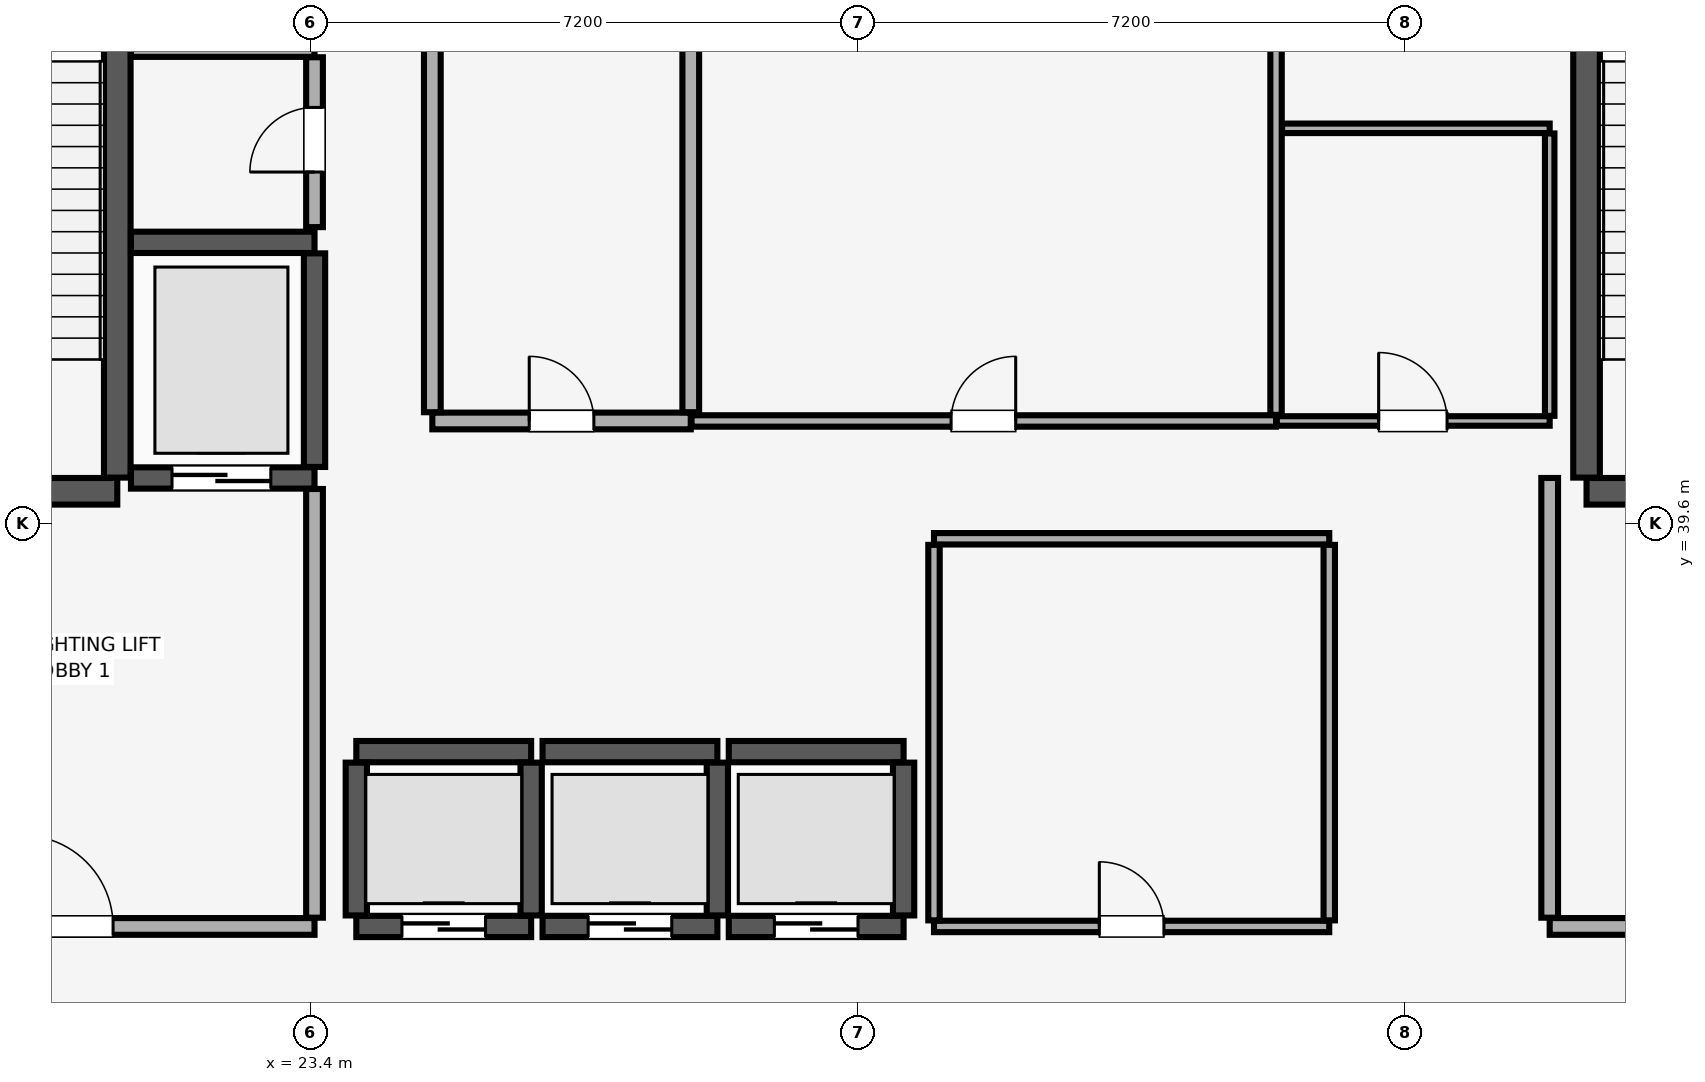
"""IFC4 building model, lengths in metres.
Left out: names, types, materials, properties, quantities, classifications, styles, units other than length and angle.
Written with IfcOpenShell. Run it as: python <this file> out.ifc"""

import sys

from ifc_helpers import new_model, si_unit, direction, frame, frame_2d, origin, place, context, subcontext, project, spatial, rectangle, extrude, element, fill, save


model = new_model("IFC4")
c1 = context("Model", 3, precision=1e-05, world=origin(), true_north=direction((0.0, 1.0)))
c2 = subcontext(c1, "Body", "Model", "MODEL_VIEW")
j1 = project(units=[si_unit("LENGTHUNIT", "METRE"), si_unit("PLANEANGLEUNIT", "RADIAN")], contexts=[c1])
p1 = place(None, origin())
s1 = spatial("IfcSite", under=j1, at=p1, CompositionType="ELEMENT")
p2 = place(p1, origin())
s2 = spatial("IfcBuilding", under=s1, at=p2, CompositionType="ELEMENT")
p3 = place(p2, frame((0.0, 0.0, 280.5)))
s3 = spatial("IfcBuildingStorey", under=s2, at=p3, CompositionType="ELEMENT", Elevation=280.5)
p4 = place(p3, frame((16.555, 40.025, 0.0), z_axis=(0.0, 0.0, 1.0), x_axis=(1.0, 0.0, 0.0)))
e1 = element("IfcWall", 1, at=p4, inside=s3, PredefinedType="SHEAR", context=c2, shape_type="SweptSolid", body=[
    extrude(rectangle(XDim=4.3, YDim=0.35, at=frame_2d((2.15, 0.0))), origin(), (0.0, 0.0, 1.0), 5.1),
])
p5 = place(p4, frame((1.91, 0.0, 0.0)))
e2 = element("IfcOpeningElement", 2, at=p5, cuts=e1, PredefinedType="OPENING", context=c2, shape_type="SweptSolid", body=[
    extrude(rectangle(XDim=1.15, YDim=2.15, at=frame_2d((0.575, 1.075))), frame((0.0, 0.185, 0.0), z_axis=(0.0, -1.0, 0.0), x_axis=(1.0, 0.0, 0.0)), (0.0, 0.0, 1.0), 0.37),
])
p6 = place(p3, frame((20.855, 40.205, 0.0), z_axis=(0.0, 0.0, 1.0), x_axis=(0.0, 1.0, 0.0)))
e3 = element("IfcWall", 3, at=p6, inside=s3, PredefinedType="SHEAR", context=c2, shape_type="SweptSolid", body=[
    extrude(rectangle(XDim=8.09, YDim=0.35, at=frame_2d((4.045, 0.0))), origin(), (0.0, 0.0, 1.0), 5.1),
])
p7 = place(p3, frame((40.185, 40.025, 0.0), z_axis=(0.0, 0.0, 1.0), x_axis=(1.0, 0.0, 0.0)))
e4 = element("IfcWall", 4, at=p7, inside=s3, PredefinedType="SHEAR", context=c2, shape_type="SweptSolid", body=[
    extrude(rectangle(XDim=3.63, YDim=0.35, at=frame_2d((1.815, 0.0))), origin(), (0.0, 0.0, 1.0), 5.1),
])
p8 = place(p7, frame((1.24, 0.0, 0.0)))
e5 = element("IfcOpeningElement", 5, at=p8, cuts=e4, PredefinedType="OPENING", context=c2, shape_type="SweptSolid", body=[
    extrude(rectangle(XDim=1.15, YDim=2.15, at=frame_2d((0.575, 1.075))), frame((0.0, 0.185, 0.0), z_axis=(0.0, -1.0, 0.0), x_axis=(1.0, 0.0, 0.0)), (0.0, 0.0, 1.0), 0.37),
])
p9 = place(p3, frame((40.185, 40.205, 0.0), z_axis=(0.0, 0.0, 1.0), x_axis=(0.0, 1.0, 0.0)))
e6 = element("IfcWall", 6, at=p9, inside=s3, PredefinedType="SHEAR", context=c2, shape_type="SweptSolid", body=[
    extrude(rectangle(XDim=8.09, YDim=0.35, at=frame_2d((4.045, 0.0))), origin(), (0.0, 0.0, 1.0), 5.1),
])
p10 = place(p3, frame((24.0, 34.3, 0.0), z_axis=(0.0, 0.0, 1.0), x_axis=(1.0, 0.0, 0.0)))
e7 = element("IfcWall", 7, at=p10, inside=s3, PredefinedType="SHEAR", context=c2, shape_type="SweptSolid", body=[
    extrude(rectangle(XDim=2.3, YDim=0.28, at=frame_2d((1.15, 0.0))), origin(), (0.0, 0.0, 1.0), 5.1),
])
p11 = place(p10, frame((0.6, 0.0, 0.0)))
e8 = element("IfcOpeningElement", 8, at=p11, cuts=e7, PredefinedType="OPENING", context=c2, shape_type="SweptSolid", body=[
    extrude(rectangle(XDim=1.1, YDim=2.2, at=frame_2d((0.55, 1.1))), frame((0.0, 0.15, 0.0), z_axis=(0.0, -1.0, 0.0), x_axis=(1.0, 0.0, 0.0)), (0.0, 0.0, 1.0), 0.3),
])
p12 = place(p3, frame((24.0, 36.6, 0.0), z_axis=(0.0, 0.0, 1.0), x_axis=(1.0, 0.0, 0.0)))
e9 = element("IfcWall", 9, at=p12, inside=s3, PredefinedType="SHEAR", context=c2, shape_type="SweptSolid", body=[
    extrude(rectangle(XDim=2.3, YDim=0.28, at=frame_2d((1.15, 0.0))), origin(), (0.0, 0.0, 1.0), 5.1),
])
for number, where, z_axis, x_axis in (
    (10, (24.0, 34.445, 0.0), (0.0, 0.0, 1.0), (0.0, 1.0, 0.0)),
    (11, (26.3, 34.445, 0.0), (0.0, 0.0, 1.0), (0.0, 1.0, 0.0)),
):
    element("IfcWall", number, at=place(p3, frame(where, z_axis=z_axis, x_axis=x_axis)), inside=s3, PredefinedType="SHEAR", context=c2, shape_type="SweptSolid", body=[
        extrude(rectangle(XDim=2.01, YDim=0.28, at=frame_2d((1.005, 0.0))), origin(), (0.0, 0.0, 1.0), 5.1),
    ])
p13 = place(p3, frame((26.45, 34.3, 0.0), z_axis=(0.0, 0.0, 1.0), x_axis=(1.0, 0.0, 0.0)))
e12 = element("IfcWall", 12, at=p13, inside=s3, PredefinedType="SHEAR", context=c2, shape_type="SweptSolid", body=[
    extrude(rectangle(XDim=2.3, YDim=0.28, at=frame_2d((1.15, 0.0))), origin(), (0.0, 0.0, 1.0), 5.1),
])
p14 = place(p13, frame((0.6, 0.0, 0.0)))
e13 = element("IfcOpeningElement", 13, at=p14, cuts=e12, PredefinedType="OPENING", context=c2, shape_type="SweptSolid", body=[
    extrude(rectangle(XDim=1.1, YDim=2.2, at=frame_2d((0.55, 1.1))), frame((0.0, 0.15, 0.0), z_axis=(0.0, -1.0, 0.0), x_axis=(1.0, 0.0, 0.0)), (0.0, 0.0, 1.0), 0.3),
])
p15 = place(p3, frame((26.45, 36.6, 0.0), z_axis=(0.0, 0.0, 1.0), x_axis=(1.0, 0.0, 0.0)))
e14 = element("IfcWall", 14, at=p15, inside=s3, PredefinedType="SHEAR", context=c2, shape_type="SweptSolid", body=[
    extrude(rectangle(XDim=2.3, YDim=0.28, at=frame_2d((1.15, 0.0))), origin(), (0.0, 0.0, 1.0), 5.1),
])
p16 = place(p3, frame((28.75, 34.445, 0.0), z_axis=(0.0, 0.0, 1.0), x_axis=(0.0, 1.0, 0.0)))
e15 = element("IfcWall", 15, at=p16, inside=s3, PredefinedType="SHEAR", context=c2, shape_type="SweptSolid", body=[
    extrude(rectangle(XDim=2.01, YDim=0.28, at=frame_2d((1.005, 0.0))), origin(), (0.0, 0.0, 1.0), 5.1),
])
p17 = place(p3, frame((28.9, 34.3, 0.0), z_axis=(0.0, 0.0, 1.0), x_axis=(1.0, 0.0, 0.0)))
e16 = element("IfcWall", 16, at=p17, inside=s3, PredefinedType="SHEAR", context=c2, shape_type="SweptSolid", body=[
    extrude(rectangle(XDim=2.3, YDim=0.28, at=frame_2d((1.15, 0.0))), origin(), (0.0, 0.0, 1.0), 5.1),
])
p18 = place(p17, frame((0.6, 0.0, 0.0)))
e17 = element("IfcOpeningElement", 17, at=p18, cuts=e16, PredefinedType="OPENING", context=c2, shape_type="SweptSolid", body=[
    extrude(rectangle(XDim=1.1, YDim=2.2, at=frame_2d((0.55, 1.1))), frame((0.0, 0.15, 0.0), z_axis=(0.0, -1.0, 0.0), x_axis=(1.0, 0.0, 0.0)), (0.0, 0.0, 1.0), 0.3),
])
p19 = place(p3, frame((28.9, 36.6, 0.0), z_axis=(0.0, 0.0, 1.0), x_axis=(1.0, 0.0, 0.0)))
e18 = element("IfcWall", 18, at=p19, inside=s3, PredefinedType="SHEAR", context=c2, shape_type="SweptSolid", body=[
    extrude(rectangle(XDim=2.3, YDim=0.28, at=frame_2d((1.15, 0.0))), origin(), (0.0, 0.0, 1.0), 5.1),
])
p20 = place(p3, frame((31.2, 34.445, 0.0), z_axis=(0.0, 0.0, 1.0), x_axis=(0.0, 1.0, 0.0)))
e19 = element("IfcWall", 19, at=p20, inside=s3, PredefinedType="SHEAR", context=c2, shape_type="SweptSolid", body=[
    extrude(rectangle(XDim=2.01, YDim=0.28, at=frame_2d((1.005, 0.0))), origin(), (0.0, 0.0, 1.0), 5.1),
])
p21 = place(p3, frame((21.035, 40.2, 0.0), z_axis=(0.0, 0.0, 1.0), x_axis=(1.0, 0.0, 0.0)))
e20 = element("IfcWall", 20, at=p21, inside=s3, PredefinedType="SHEAR", context=c2, shape_type="SweptSolid", body=[
    extrude(rectangle(XDim=2.415, YDim=0.28, at=frame_2d((1.208, 0.0))), origin(), (0.0, 0.0, 1.0), 5.1),
])
p22 = place(p21, frame((0.54, 0.0, 0.0)))
e21 = element("IfcOpeningElement", 21, at=p22, cuts=e20, PredefinedType="OPENING", context=c2, shape_type="SweptSolid", body=[
    extrude(rectangle(XDim=1.3, YDim=2.3, at=frame_2d((0.65, 1.15))), frame((0.0, 0.15, 0.0), z_axis=(0.0, -1.0, 0.0), x_axis=(1.0, 0.0, 0.0)), (0.0, 0.0, 1.0), 0.3),
])
p23 = place(p3, frame((21.035, 43.3, 0.0), z_axis=(0.0, 0.0, 1.0), x_axis=(1.0, 0.0, 0.0)))
e22 = element("IfcWall", 22, at=p23, inside=s3, PredefinedType="SHEAR", context=c2, shape_type="SweptSolid", body=[
    extrude(rectangle(XDim=2.415, YDim=0.28, at=frame_2d((1.208, 0.0))), origin(), (0.0, 0.0, 1.0), 5.1),
])
p24 = place(p3, frame((23.45, 40.345, 0.0), z_axis=(0.0, 0.0, 1.0), x_axis=(0.0, 1.0, 0.0)))
e23 = element("IfcWall", 23, at=p24, inside=s3, PredefinedType="SHEAR", context=c2, shape_type="SweptSolid", body=[
    extrude(rectangle(XDim=2.81, YDim=0.28, at=frame_2d((1.405, 0.0))), origin(), (0.0, 0.0, 1.0), 5.1),
])
p25 = place(p3, frame((17.4, 34.3, 0.0), z_axis=(0.0, 0.0, 1.0), x_axis=(1.0, 0.0, 0.0)))
e24 = element("IfcWall", 24, at=p25, inside=s3, PredefinedType="PARTITIONING", context=c2, shape_type="SweptSolid", body=[
    extrude(rectangle(XDim=6.05, YDim=0.22, at=frame_2d((3.025, 0.0))), origin(), (0.0, 0.0, 1.0), 5.1),
])
p26 = place(p25, frame((2.2, 0.0, 0.0)))
e25 = element("IfcOpeningElement", 25, at=p26, cuts=e24, PredefinedType="OPENING", context=c2, shape_type="SweptSolid", body=[
    extrude(rectangle(XDim=1.2, YDim=2.15, at=frame_2d((0.6, 1.075))), frame((0.0, 0.12, 0.0), z_axis=(0.0, -1.0, 0.0), x_axis=(1.0, 0.0, 0.0)), (0.0, 0.0, 1.0), 0.24),
])
p27 = place(p3, frame((23.45, 34.415, 0.0), z_axis=(0.0, 0.0, 1.0), x_axis=(0.0, 1.0, 0.0)))
e26 = element("IfcWall", 26, at=p27, inside=s3, PredefinedType="PARTITIONING", context=c2, shape_type="SweptSolid", body=[
    extrude(rectangle(XDim=5.64, YDim=0.22, at=frame_2d((2.82, 0.0))), origin(), (0.0, 0.0, 1.0), 5.1),
])
p28 = place(p3, frame((39.7, 34.3, 0.0), z_axis=(0.0, 0.0, 1.0), x_axis=(1.0, 0.0, 0.0)))
e27 = element("IfcWall", 27, at=p28, inside=s3, PredefinedType="PARTITIONING", context=c2, shape_type="SweptSolid", body=[
    extrude(rectangle(XDim=4.6, YDim=0.22, at=frame_2d((2.3, 0.0))), origin(), (0.0, 0.0, 1.0), 5.1),
])
p29 = place(p28, frame((1.7, 0.0, 0.0)))
e28 = element("IfcOpeningElement", 28, at=p29, cuts=e27, PredefinedType="OPENING", context=c2, shape_type="SweptSolid", body=[
    extrude(rectangle(XDim=1.2, YDim=2.15, at=frame_2d((0.6, 1.075))), frame((0.0, 0.12, 0.0), z_axis=(0.0, -1.0, 0.0), x_axis=(1.0, 0.0, 0.0)), (0.0, 0.0, 1.0), 0.24),
])
p30 = place(p3, frame((39.7, 34.415, 0.0), z_axis=(0.0, 0.0, 1.0), x_axis=(0.0, 1.0, 0.0)))
e29 = element("IfcWall", 29, at=p30, inside=s3, PredefinedType="PARTITIONING", context=c2, shape_type="SweptSolid", body=[
    extrude(rectangle(XDim=5.785, YDim=0.22, at=frame_2d((2.893, 0.0))), origin(), (0.0, 0.0, 1.0), 5.1),
])
p31 = place(p3, frame((21.035, 45.85, 0.0), z_axis=(0.0, 0.0, 1.0), x_axis=(1.0, 0.0, 0.0)))
e30 = element("IfcWall", 30, at=p31, inside=s3, PredefinedType="PARTITIONING", context=c2, shape_type="SweptSolid", body=[
    extrude(rectangle(XDim=2.415, YDim=0.22, at=frame_2d((1.208, 0.0))), origin(), (0.0, 0.0, 1.0), 5.1),
])
p32 = place(p3, frame((23.45, 43.5, 0.0), z_axis=(0.0, 0.0, 1.0), x_axis=(0.0, 1.0, 0.0)))
e31 = element("IfcWall", 31, at=p32, inside=s3, PredefinedType="PARTITIONING", context=c2, shape_type="SweptSolid", body=[
    extrude(rectangle(XDim=2.235, YDim=0.22, at=frame_2d((1.118, 0.0))), origin(), (0.0, 0.0, 1.0), 5.1),
])
p33 = place(p32, frame((0.725, 0.0, 0.0)))
e32 = element("IfcOpeningElement", 32, at=p33, cuts=e31, PredefinedType="OPENING", context=c2, shape_type="SweptSolid", body=[
    extrude(rectangle(XDim=0.85, YDim=2.1, at=frame_2d((0.425, 1.05))), frame((0.0, 0.12, 0.0), z_axis=(0.0, -1.0, 0.0), x_axis=(1.0, 0.0, 0.0)), (0.0, 0.0, 1.0), 0.24),
])
p34 = place(p3, frame((31.6, 34.3, 0.0), z_axis=(0.0, 0.0, 1.0), x_axis=(1.0, 0.0, 0.0)))
e33 = element("IfcWall", 33, at=p34, inside=s3, PredefinedType="PARTITIONING", context=c2, shape_type="SweptSolid", body=[
    extrude(rectangle(XDim=5.2, YDim=0.15, at=frame_2d((2.6, 0.0))), origin(), (0.0, 0.0, 1.0), 5.1),
])
p35 = place(p34, frame((2.175, 0.0, 0.0)))
e34 = element("IfcOpeningElement", 34, at=p35, cuts=e33, PredefinedType="OPENING", context=c2, shape_type="SweptSolid", body=[
    extrude(rectangle(XDim=0.85, YDim=2.1, at=frame_2d((0.425, 1.05))), frame((0.0, 0.085, 0.0), z_axis=(0.0, -1.0, 0.0), x_axis=(1.0, 0.0, 0.0)), (0.0, 0.0, 1.0), 0.17),
])
p36 = place(p3, frame((31.6, 39.4, 0.0), z_axis=(0.0, 0.0, 1.0), x_axis=(1.0, 0.0, 0.0)))
e35 = element("IfcWall", 35, at=p36, inside=s3, PredefinedType="PARTITIONING", context=c2, shape_type="SweptSolid", body=[
    extrude(rectangle(XDim=5.2, YDim=0.15, at=frame_2d((2.6, 0.0))), origin(), (0.0, 0.0, 1.0), 5.1),
])
for number, where, z_axis, x_axis in (
    (36, (31.6, 34.38, 0.0), (0.0, 0.0, 1.0), (0.0, 1.0, 0.0)),
    (37, (36.8, 34.38, 0.0), (0.0, 0.0, 1.0), (0.0, 1.0, 0.0)),
):
    element("IfcWall", number, at=place(p3, frame(where, z_axis=z_axis, x_axis=x_axis)), inside=s3, PredefinedType="PARTITIONING", context=c2, shape_type="SweptSolid", body=[
        extrude(rectangle(XDim=4.94, YDim=0.15, at=frame_2d((2.47, 0.0))), origin(), (0.0, 0.0, 1.0), 5.1),
    ])
p37 = place(p3, frame((25.0, 40.95, 0.0), z_axis=(0.0, 0.0, 1.0), x_axis=(1.0, 0.0, 0.0)))
e38 = element("IfcWall", 38, at=p37, inside=s3, PredefinedType="PARTITIONING", context=c2, shape_type="SweptSolid", body=[
    extrude(rectangle(XDim=3.4, YDim=0.22, at=frame_2d((1.7, 0.0))), origin(), (0.0, 0.0, 1.0), 5.1),
])
p38 = place(p37, frame((1.275, 0.0, 0.0)))
e39 = element("IfcOpeningElement", 39, at=p38, cuts=e38, PredefinedType="OPENING", context=c2, shape_type="SweptSolid", body=[
    extrude(rectangle(XDim=0.85, YDim=2.1, at=frame_2d((0.425, 1.05))), frame((0.0, 0.12, 0.0), z_axis=(0.0, -1.0, 0.0), x_axis=(1.0, 0.0, 0.0)), (0.0, 0.0, 1.0), 0.24),
])
for number, where, z_axis, x_axis in (
    (40, (25.0, 41.065, 0.0), (0.0, 0.0, 1.0), (0.0, 1.0, 0.0)),
    (41, (28.4, 41.065, 0.0), (0.0, 0.0, 1.0), (0.0, 1.0, 0.0)),
):
    element("IfcWall", number, at=place(p3, frame(where, z_axis=z_axis, x_axis=x_axis)), inside=s3, PredefinedType="PARTITIONING", context=c2, shape_type="SweptSolid", body=[
        extrude(rectangle(XDim=7.785, YDim=0.22, at=frame_2d((3.893, 0.0))), origin(), (0.0, 0.0, 1.0), 5.1),
    ])
p39 = place(p3, frame((28.41, 40.95, 0.0), z_axis=(0.0, 0.0, 1.0), x_axis=(1.0, 0.0, 0.0)))
e42 = element("IfcWall", 42, at=p39, inside=s3, PredefinedType="PARTITIONING", context=c2, shape_type="SweptSolid", body=[
    extrude(rectangle(XDim=7.69, YDim=0.15, at=frame_2d((3.845, 0.0))), origin(), (0.0, 0.0, 1.0), 5.1),
])
p40 = place(p39, frame((3.415, 0.0, 0.0)))
e43 = element("IfcOpeningElement", 43, at=p40, cuts=e42, PredefinedType="OPENING", context=c2, shape_type="SweptSolid", body=[
    extrude(rectangle(XDim=0.85, YDim=2.1, at=frame_2d((0.425, 1.05))), frame((0.0, 0.085, 0.0), z_axis=(0.0, -1.0, 0.0), x_axis=(1.0, 0.0, 0.0)), (0.0, 0.0, 1.0), 0.17),
])
p41 = place(p3, frame((36.1, 41.03, 0.0), z_axis=(0.0, 0.0, 1.0), x_axis=(0.0, 1.0, 0.0)))
e44 = element("IfcWall", 44, at=p41, inside=s3, PredefinedType="PARTITIONING", context=c2, shape_type="SweptSolid", body=[
    extrude(rectangle(XDim=7.82, YDim=0.15, at=frame_2d((3.91, 0.0))), origin(), (0.0, 0.0, 1.0), 5.1),
])
p42 = place(p3, frame((36.11, 40.95, 0.0), z_axis=(0.0, 0.0, 1.0), x_axis=(1.0, 0.0, 0.0)))
e45 = element("IfcWall", 45, at=p42, inside=s3, PredefinedType="PARTITIONING", context=c2, shape_type="SweptSolid", body=[
    extrude(rectangle(XDim=3.59, YDim=0.125, at=frame_2d((1.795, 0.0))), origin(), (0.0, 0.0, 1.0), 5.1),
])
p43 = place(p42, frame((1.34, 0.0, 0.0)))
e46 = element("IfcOpeningElement", 46, at=p43, cuts=e45, PredefinedType="OPENING", context=c2, shape_type="SweptSolid", body=[
    extrude(rectangle(XDim=0.9, YDim=2.1, at=frame_2d((0.45, 1.05))), frame((0.0, 0.073, 0.0), z_axis=(0.0, -1.0, 0.0), x_axis=(1.0, 0.0, 0.0)), (0.0, 0.0, 1.0), 0.145),
])
p44 = place(p3, frame((36.18, 44.8, 0.0), z_axis=(0.0, 0.0, 1.0), x_axis=(1.0, 0.0, 0.0)))
e47 = element("IfcWall", 47, at=p44, inside=s3, PredefinedType="PARTITIONING", context=c2, shape_type="SweptSolid", body=[
    extrude(rectangle(XDim=3.52, YDim=0.125, at=frame_2d((1.76, 0.0))), origin(), (0.0, 0.0, 1.0), 5.1),
])
p45 = place(p3, frame((39.7, 41.018, 0.0), z_axis=(0.0, 0.0, 1.0), x_axis=(0.0, 1.0, 0.0)))
e48 = element("IfcWall", 48, at=p45, inside=s3, PredefinedType="PARTITIONING", context=c2, shape_type="SweptSolid", body=[
    extrude(rectangle(XDim=3.715, YDim=0.125, at=frame_2d((1.857, 0.0))), origin(), (0.0, 0.0, 1.0), 5.1),
])
p46 = place(p11, origin())
e49 = element("IfcDoor", 49, at=p46, inside=s3, OperationType="DOUBLE_DOOR_SLIDING", PredefinedType="DOOR", context=c2, shape_type="SweptSolid", body=[
    extrude(rectangle(XDim=1.1, YDim=2.2, at=frame_2d((0.55, 1.1))), frame((0.0, 0.025, 0.0), z_axis=(0.0, -1.0, 0.0), x_axis=(1.0, 0.0, 0.0)), (0.0, 0.0, 1.0), 0.05),
])
fill(e8, e49)
p47 = place(p14, origin())
e50 = element("IfcDoor", 50, at=p47, inside=s3, OperationType="DOUBLE_DOOR_SLIDING", PredefinedType="DOOR", context=c2, shape_type="SweptSolid", body=[
    extrude(rectangle(XDim=1.1, YDim=2.2, at=frame_2d((0.55, 1.1))), frame((0.0, 0.025, 0.0), z_axis=(0.0, -1.0, 0.0), x_axis=(1.0, 0.0, 0.0)), (0.0, 0.0, 1.0), 0.05),
])
fill(e13, e50)
p48 = place(p18, origin())
e51 = element("IfcDoor", 51, at=p48, inside=s3, OperationType="DOUBLE_DOOR_SLIDING", PredefinedType="DOOR", context=c2, shape_type="SweptSolid", body=[
    extrude(rectangle(XDim=1.1, YDim=2.2, at=frame_2d((0.55, 1.1))), frame((0.0, 0.025, 0.0), z_axis=(0.0, -1.0, 0.0), x_axis=(1.0, 0.0, 0.0)), (0.0, 0.0, 1.0), 0.05),
])
fill(e17, e51)
p49 = place(p22, origin())
e52 = element("IfcDoor", 52, at=p49, inside=s3, OperationType="DOUBLE_DOOR_SLIDING", PredefinedType="DOOR", context=c2, shape_type="SweptSolid", body=[
    extrude(rectangle(XDim=1.3, YDim=2.3, at=frame_2d((0.65, 1.15))), frame((0.0, 0.025, 0.0), z_axis=(0.0, -1.0, 0.0), x_axis=(1.0, 0.0, 0.0)), (0.0, 0.0, 1.0), 0.05),
])
fill(e21, e52)
p50 = place(p26, origin())
e53 = element("IfcDoor", 53, at=p50, inside=s3, OperationType="SINGLE_SWING_LEFT", PredefinedType="DOOR", context=c2, shape_type="SweptSolid", body=[
    extrude(rectangle(XDim=1.2, YDim=2.15, at=frame_2d((0.6, 1.075))), frame((0.0, 0.025, 0.0), z_axis=(0.0, -1.0, 0.0), x_axis=(1.0, 0.0, 0.0)), (0.0, 0.0, 1.0), 0.05),
])
fill(e25, e53)
p51 = place(p33, origin())
e54 = element("IfcDoor", 54, at=p51, inside=s3, OperationType="SINGLE_SWING_LEFT", PredefinedType="DOOR", context=c2, shape_type="SweptSolid", body=[
    extrude(rectangle(XDim=0.85, YDim=2.1, at=frame_2d((0.425, 1.05))), frame((0.0, 0.025, 0.0), z_axis=(0.0, -1.0, 0.0), x_axis=(1.0, 0.0, 0.0)), (0.0, 0.0, 1.0), 0.05),
])
fill(e32, e54)
p52 = place(p35, origin())
e55 = element("IfcDoor", 55, at=p52, inside=s3, OperationType="SINGLE_SWING_LEFT", PredefinedType="DOOR", context=c2, shape_type="SweptSolid", body=[
    extrude(rectangle(XDim=0.85, YDim=2.1, at=frame_2d((0.425, 1.05))), frame((0.0, 0.025, 0.0), z_axis=(0.0, -1.0, 0.0), x_axis=(1.0, 0.0, 0.0)), (0.0, 0.0, 1.0), 0.05),
])
fill(e34, e55)
p53 = place(p38, origin())
e56 = element("IfcDoor", 56, at=p53, inside=s3, OperationType="SINGLE_SWING_LEFT", PredefinedType="DOOR", context=c2, shape_type="SweptSolid", body=[
    extrude(rectangle(XDim=0.85, YDim=2.1, at=frame_2d((0.425, 1.05))), frame((0.0, 0.025, 0.0), z_axis=(0.0, -1.0, 0.0), x_axis=(1.0, 0.0, 0.0)), (0.0, 0.0, 1.0), 0.05),
])
fill(e39, e56)
p54 = place(p40, origin())
e57 = element("IfcDoor", 57, at=p54, inside=s3, OperationType="SINGLE_SWING_RIGHT", PredefinedType="DOOR", context=c2, shape_type="SweptSolid", body=[
    extrude(rectangle(XDim=0.85, YDim=2.1, at=frame_2d((0.425, 1.05))), frame((0.0, 0.025, 0.0), z_axis=(0.0, -1.0, 0.0), x_axis=(1.0, 0.0, 0.0)), (0.0, 0.0, 1.0), 0.05),
])
fill(e43, e57)
p55 = place(p43, origin())
e58 = element("IfcDoor", 58, at=p55, inside=s3, OperationType="SINGLE_SWING_LEFT", PredefinedType="DOOR", context=c2, shape_type="SweptSolid", body=[
    extrude(rectangle(XDim=0.9, YDim=2.1, at=frame_2d((0.45, 1.05))), frame((0.0, 0.025, 0.0), z_axis=(0.0, -1.0, 0.0), x_axis=(1.0, 0.0, 0.0)), (0.0, 0.0, 1.0), 0.05),
])
fill(e46, e58)
save(model, sys.argv[1])
